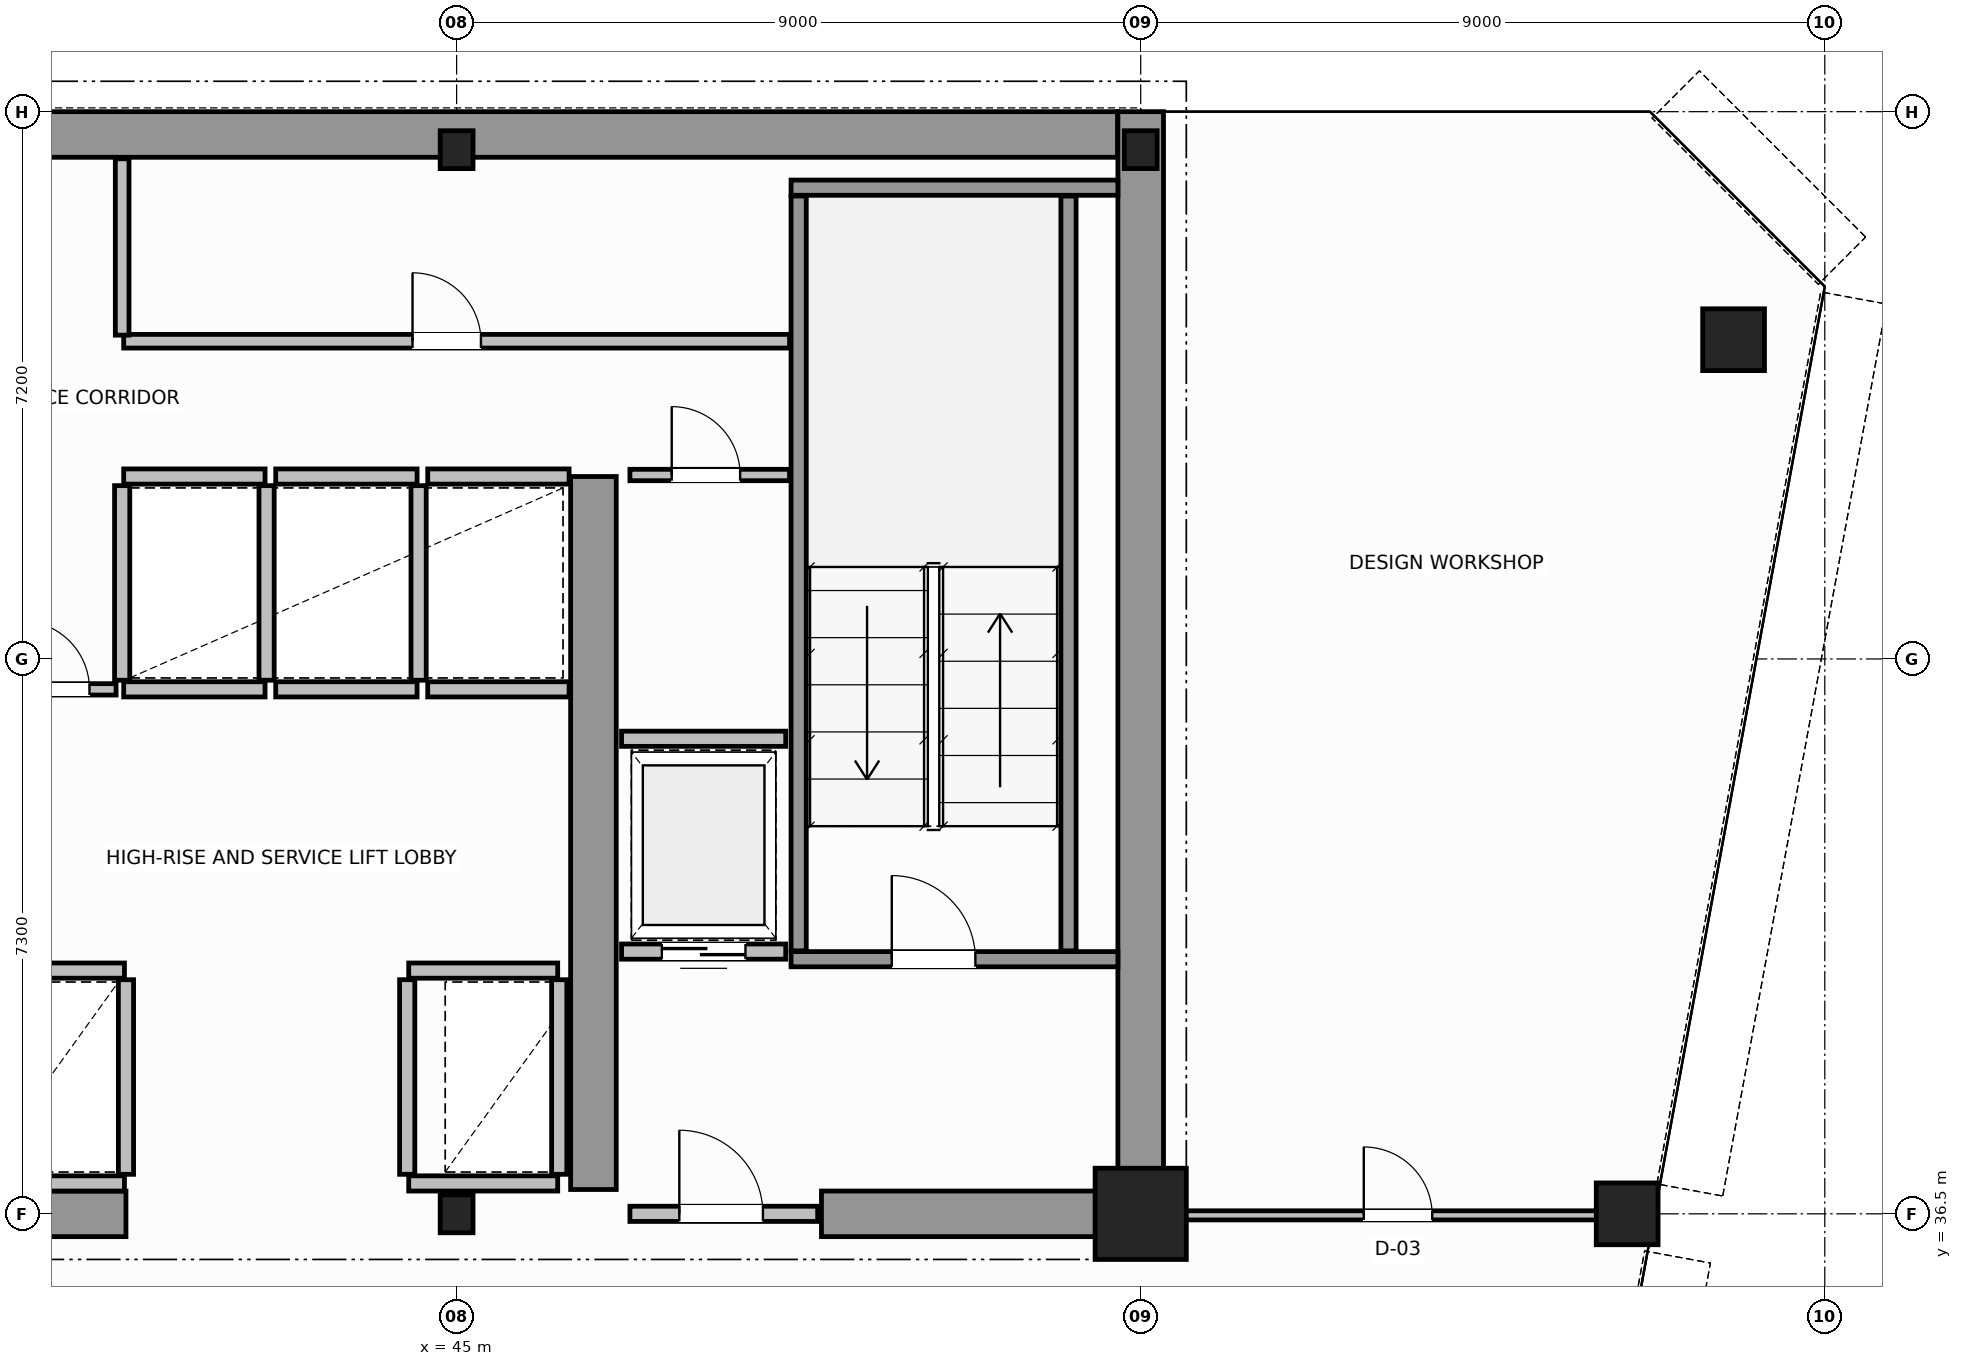
"""IFC4 building model, lengths in metres.
Left out: names, types, materials, properties, quantities, classifications, styles, units other than length and angle.
Written with IfcOpenShell. Run it as: python <this file> out.ifc"""

import sys

from ifc_helpers import new_model, si_unit, direction, frame, frame_2d, origin, origin_2d, place, context, subcontext, project, spatial, rectangle, hollow_circle, i_section, extrude, source, transform, mapped, element, fill, save


model = new_model("IFC4")
c1 = context("Model", 3, precision=1e-05, world=origin(), true_north=direction((0.0, 1.0)))
c2 = subcontext(c1, "Body", "Model", "MODEL_VIEW")
j1 = project(units=[si_unit("LENGTHUNIT", "METRE"), si_unit("PLANEANGLEUNIT", "RADIAN")], contexts=[c1])
p1 = place(None, origin())
s1 = spatial("IfcSite", under=j1, at=p1, CompositionType="ELEMENT")
p2 = place(p1, origin())
s2 = spatial("IfcBuilding", under=s1, at=p2, CompositionType="ELEMENT")
p3 = place(p2, frame((0.0, 0.0, 195.6)))
s3 = spatial("IfcBuildingStorey", under=s2, at=p3, CompositionType="ELEMENT", Elevation=195.6)
m1 = source(origin(), c2, "Body", "SweptSolid", [
    extrude(i_section(OverallWidth=0.432, OverallDepth=0.498, WebThickness=0.055, FlangeThickness=0.068, FilletRadius=0.015, at=origin_2d()), origin(), (0.0, 0.0, 1.0), 3.8),
])
p4 = place(p3, frame((45.0, 36.5, 0.0), z_axis=(0.0, 0.0, 1.0), x_axis=(1.0, 0.0, 0.0)))
e1 = element("IfcColumn", 1, at=p4, inside=s3, PredefinedType="COLUMN", context=c2, shape_type="MappedRepresentation", body=[
    mapped(m1, transform((0.0, 0.0, 0.0), scale=1.0)),
])
m2 = source(origin(), c2, "Body", "SweptSolid", [
    extrude(rectangle(XDim=1.2, YDim=1.2, at=origin_2d()), origin(), (0.0, 0.0, 1.0), 3.8),
])
p5 = place(p3, frame((54.0, 36.5, 0.0), z_axis=(0.0, 0.0, 1.0), x_axis=(1.0, 0.0, 0.0)))
e2 = element("IfcColumn", 2, at=p5, inside=s3, PredefinedType="COLUMN", context=c2, shape_type="MappedRepresentation", body=[
    mapped(m2, transform((0.0, 0.0, 0.0), scale=1.0)),
])
for number, where, z_axis, x_axis in (
    (3, (45.0, 50.5, 0.0), (0.0, 0.0, 1.0), (1.0, 0.0, 0.0)),
    (4, (54.0, 50.5, 0.0), (0.0, 0.0, 1.0), (1.0, 0.0, 0.0)),
):
    element("IfcColumn", number, at=place(p3, frame(where, z_axis=z_axis, x_axis=x_axis)), inside=s3, PredefinedType="COLUMN", context=c2, shape_type="MappedRepresentation", body=[
        mapped(m1, transform((0.0, 0.0, 0.0), scale=1.0)),
    ])
m3 = source(origin(), c2, "Body", "SweptSolid", [
    extrude(hollow_circle(Radius=0.406, WallThickness=0.04, at=origin_2d()), origin(), (0.0, 0.0, 1.0), 3.8),
])
for number, where, z_axis, x_axis in (
    (5, (61.8, 48.0, 0.0), (0.0, 0.0, 1.0), (1.0, 0.0, 0.0)),
    (6, (60.4, 36.5, 0.0), (0.0, 0.0, 1.0), (1.0, 0.0, 0.0)),
):
    element("IfcColumn", number, at=place(p3, frame(where, z_axis=z_axis, x_axis=x_axis)), inside=s3, PredefinedType="COLUMN", context=c2, shape_type="MappedRepresentation", body=[
        mapped(m3, transform((0.0, 0.0, 0.0), scale=1.0)),
    ])
p6 = place(p3, frame((34.002, 50.7, 0.0), z_axis=(0.0, 0.0, 1.0), x_axis=(1.0, 0.0, 0.0)))
e7 = element("IfcWall", 7, at=p6, inside=s3, PredefinedType="SHEAR", context=c2, shape_type="SweptSolid", body=[
    extrude(rectangle(XDim=19.694, YDim=0.6, at=frame_2d((9.847, 0.0))), origin(), (0.0, 0.0, 1.0), 3.8),
])
p7 = place(p3, frame((54.0, 36.5, 0.0), z_axis=(0.0, 0.0, 1.0), x_axis=(0.0, 1.0, 0.0)))
e8 = element("IfcWall", 8, at=p7, inside=s3, PredefinedType="SHEAR", context=c2, shape_type="SweptSolid", body=[
    extrude(rectangle(XDim=14.5, YDim=0.6, at=frame_2d((7.25, 0.0))), origin(), (0.0, 0.0, 1.0), 3.8),
])
p8 = place(p3, frame((36.15, 36.5, 0.0), z_axis=(0.0, 0.0, 1.0), x_axis=(1.0, 0.0, 0.0)))
e9 = element("IfcWall", 9, at=p8, inside=s3, PredefinedType="SHEAR", context=c2, shape_type="SweptSolid", body=[
    extrude(rectangle(XDim=4.5, YDim=0.6, at=frame_2d((2.25, 0.0))), origin(), (0.0, 0.0, 1.0), 3.8),
])
p9 = place(p3, frame((49.8, 36.5, 0.0), z_axis=(0.0, 0.0, 1.0), x_axis=(1.0, 0.0, 0.0)))
e10 = element("IfcWall", 10, at=p9, inside=s3, PredefinedType="SHEAR", context=c2, shape_type="SweptSolid", body=[
    extrude(rectangle(XDim=3.88, YDim=0.6, at=frame_2d((1.94, 0.0))), origin(), (0.0, 0.0, 1.0), 2.58),
])
p10 = place(p3, frame((46.8, 36.82, 0.0), z_axis=(0.0, 0.0, 1.0), x_axis=(0.0, 1.0, 0.0)))
e11 = element("IfcWall", 11, at=p10, inside=s3, PredefinedType="SHEAR", context=c2, shape_type="SweptSolid", body=[
    extrude(rectangle(XDim=9.38, YDim=0.6, at=frame_2d((4.69, 0.0))), origin(), (0.0, 0.0, 1.0), 3.8),
])
p11 = place(p3, frame((49.4, 39.85, 0.0), z_axis=(0.0, 0.0, 1.0), x_axis=(1.0, 0.0, 0.0)))
e12 = element("IfcWall", 12, at=p11, inside=s3, PredefinedType="SOLIDWALL", context=c2, shape_type="SweptSolid", body=[
    extrude(rectangle(XDim=4.3, YDim=0.2, at=frame_2d((2.15, 0.0))), origin(), (0.0, 0.0, 1.0), 3.8),
])
p12 = place(p11, frame((1.325, 0.0, 0.0)))
e13 = element("IfcOpeningElement", 13, at=p12, cuts=e12, PredefinedType="OPENING", context=c2, shape_type="SweptSolid", body=[
    extrude(rectangle(XDim=1.1, YDim=2.15, at=frame_2d((0.55, 1.075))), frame((0.0, 0.11, 0.0), z_axis=(0.0, -1.0, 0.0), x_axis=(1.0, 0.0, 0.0)), (0.0, 0.0, 1.0), 0.22),
])
p13 = place(p3, frame((49.4, 50.0, 0.0), z_axis=(0.0, 0.0, 1.0), x_axis=(1.0, 0.0, 0.0)))
e14 = element("IfcWall", 14, at=p13, inside=s3, PredefinedType="SOLIDWALL", context=c2, shape_type="SweptSolid", body=[
    extrude(rectangle(XDim=4.3, YDim=0.2, at=frame_2d((2.15, 0.0))), origin(), (0.0, 0.0, 1.0), 3.8),
])
for number, where, z_axis, x_axis in (
    (15, (49.5, 39.96, 0.0), (0.0, 0.0, 1.0), (0.0, 1.0, 0.0)),
    (16, (53.05, 39.96, 0.0), (0.0, 0.0, 1.0), (0.0, 1.0, 0.0)),
):
    element("IfcWall", number, at=place(p3, frame(where, z_axis=z_axis, x_axis=x_axis)), inside=s3, PredefinedType="SOLIDWALL", context=c2, shape_type="SweptSolid", body=[
        extrude(rectangle(XDim=9.93, YDim=0.2, at=frame_2d((4.965, 0.0))), origin(), (0.0, 0.0, 1.0), 3.8),
    ])
p14 = place(p3, frame((47.28, 36.5, 0.0), z_axis=(0.0, 0.0, 1.0), x_axis=(1.0, 0.0, 0.0)))
e17 = element("IfcWall", 17, at=p14, inside=s3, PredefinedType="SOLIDWALL", context=c2, shape_type="SweptSolid", body=[
    extrude(rectangle(XDim=2.47, YDim=0.2, at=frame_2d((1.235, 0.0))), origin(), (0.0, 0.0, 1.0), 2.57),
])
p15 = place(p14, frame((0.65, 0.0, 0.0)))
e18 = element("IfcOpeningElement", 18, at=p15, cuts=e17, PredefinedType="OPENING", context=c2, shape_type="SweptSolid", body=[
    extrude(rectangle(XDim=1.1, YDim=2.15, at=frame_2d((0.55, 1.075))), frame((0.0, 0.11, 0.0), z_axis=(0.0, -1.0, 0.0), x_axis=(1.0, 0.0, 0.0)), (0.0, 0.0, 1.0), 0.22),
])
for number, where, z_axis, x_axis in (
    (19, (38.71, 39.7, 0.0), (0.0, 0.0, 1.0), (1.0, 0.0, 0.0)),
    (20, (38.71, 36.9, 0.0), (0.0, 0.0, 1.0), (1.0, 0.0, 0.0)),
):
    element("IfcWall", number, at=place(p3, frame(where, z_axis=z_axis, x_axis=x_axis)), inside=s3, PredefinedType="SOLIDWALL", context=c2, shape_type="SweptSolid", body=[
        extrude(rectangle(XDim=1.92, YDim=0.2, at=frame_2d((0.96, 0.0))), origin(), (0.0, 0.0, 1.0), 3.58),
    ])
p16 = place(p3, frame((40.65, 37.02, 0.0), z_axis=(0.0, 0.0, 1.0), x_axis=(0.0, 1.0, 0.0)))
e21 = element("IfcWall", 21, at=p16, inside=s3, PredefinedType="SOLIDWALL", context=c2, shape_type="SweptSolid", body=[
    extrude(rectangle(XDim=2.56, YDim=0.2, at=frame_2d((1.28, 0.0))), origin(), (0.0, 0.0, 1.0), 3.58),
])
p17 = place(p3, frame((44.37, 39.7, 0.0), z_axis=(0.0, 0.0, 1.0), x_axis=(1.0, 0.0, 0.0)))
e22 = element("IfcWall", 22, at=p17, inside=s3, PredefinedType="SOLIDWALL", context=c2, shape_type="SweptSolid", body=[
    extrude(rectangle(XDim=1.96, YDim=0.2, at=frame_2d((0.98, 0.0))), origin(), (0.0, 0.0, 1.0), 3.58),
])
p18 = place(p3, frame((44.37, 36.9, 0.0), z_axis=(0.0, 0.0, 1.0), x_axis=(1.0, 0.0, 0.0)))
e23 = element("IfcWall", 23, at=p18, inside=s3, PredefinedType="SOLIDWALL", context=c2, shape_type="SweptSolid", body=[
    extrude(rectangle(XDim=1.96, YDim=0.2, at=frame_2d((0.98, 0.0))), origin(), (0.0, 0.0, 1.0), 2.57),
])
for number, where, z_axis, x_axis in (
    (24, (44.35, 37.02, 0.0), (0.0, 0.0, 1.0), (0.0, 1.0, 0.0)),
    (25, (46.35, 37.02, 0.0), (0.0, 0.0, 1.0), (0.0, 1.0, 0.0)),
):
    element("IfcWall", number, at=place(p3, frame(where, z_axis=z_axis, x_axis=x_axis)), inside=s3, PredefinedType="SOLIDWALL", context=c2, shape_type="SweptSolid", body=[
        extrude(rectangle(XDim=2.56, YDim=0.2, at=frame_2d((1.28, 0.0))), origin(), (0.0, 0.0, 1.0), 3.58),
    ])
for number, where, z_axis, x_axis in (
    (26, (40.62, 43.4, 0.0), (0.0, 0.0, 1.0), (1.0, 0.0, 0.0)),
    (27, (40.62, 46.2, 0.0), (0.0, 0.0, 1.0), (1.0, 0.0, 0.0)),
):
    element("IfcWall", number, at=place(p3, frame(where, z_axis=z_axis, x_axis=x_axis)), inside=s3, PredefinedType="SOLIDWALL", context=c2, shape_type="SweptSolid", body=[
        extrude(rectangle(XDim=1.86, YDim=0.2, at=frame_2d((0.93, 0.0))), origin(), (0.0, 0.0, 1.0), 3.58),
    ])
for number, where, z_axis, x_axis in (
    (28, (40.6, 43.52, 0.0), (0.0, 0.0, 1.0), (0.0, 1.0, 0.0)),
    (29, (42.5, 43.52, 0.0), (0.0, 0.0, 1.0), (0.0, 1.0, 0.0)),
):
    element("IfcWall", number, at=place(p3, frame(where, z_axis=z_axis, x_axis=x_axis)), inside=s3, PredefinedType="SOLIDWALL", context=c2, shape_type="SweptSolid", body=[
        extrude(rectangle(XDim=2.56, YDim=0.2, at=frame_2d((1.28, 0.0))), origin(), (0.0, 0.0, 1.0), 3.58),
    ])
for number, where, z_axis, x_axis in (
    (30, (42.62, 43.4, 0.0), (0.0, 0.0, 1.0), (1.0, 0.0, 0.0)),
    (31, (42.62, 46.2, 0.0), (0.0, 0.0, 1.0), (1.0, 0.0, 0.0)),
):
    element("IfcWall", number, at=place(p3, frame(where, z_axis=z_axis, x_axis=x_axis)), inside=s3, PredefinedType="SOLIDWALL", context=c2, shape_type="SweptSolid", body=[
        extrude(rectangle(XDim=1.86, YDim=0.2, at=frame_2d((0.93, 0.0))), origin(), (0.0, 0.0, 1.0), 3.58),
    ])
p19 = place(p3, frame((44.5, 43.52, 0.0), z_axis=(0.0, 0.0, 1.0), x_axis=(0.0, 1.0, 0.0)))
e32 = element("IfcWall", 32, at=p19, inside=s3, PredefinedType="SOLIDWALL", context=c2, shape_type="SweptSolid", body=[
    extrude(rectangle(XDim=2.56, YDim=0.2, at=frame_2d((1.28, 0.0))), origin(), (0.0, 0.0, 1.0), 3.58),
])
for number, where, z_axis, x_axis in (
    (33, (44.62, 43.4, 0.0), (0.0, 0.0, 1.0), (1.0, 0.0, 0.0)),
    (34, (44.62, 46.2, 0.0), (0.0, 0.0, 1.0), (1.0, 0.0, 0.0)),
):
    element("IfcWall", number, at=place(p3, frame(where, z_axis=z_axis, x_axis=x_axis)), inside=s3, PredefinedType="SOLIDWALL", context=c2, shape_type="SweptSolid", body=[
        extrude(rectangle(XDim=1.86, YDim=0.2, at=frame_2d((0.93, 0.0))), origin(), (0.0, 0.0, 1.0), 3.58),
    ])
p20 = place(p3, frame((47.17, 39.95, 0.0), z_axis=(0.0, 0.0, 1.0), x_axis=(1.0, 0.0, 0.0)))
e35 = element("IfcWall", 35, at=p20, inside=s3, PredefinedType="SOLIDWALL", context=c2, shape_type="SweptSolid", body=[
    extrude(rectangle(XDim=2.16, YDim=0.2, at=frame_2d((1.08, 0.0))), origin(), (0.0, 0.0, 1.0), 3.58),
])
p21 = place(p20, frame((0.53, 0.0, 0.0)))
e36 = element("IfcOpeningElement", 36, at=p21, cuts=e35, PredefinedType="OPENING", context=c2, shape_type="SweptSolid", body=[
    extrude(rectangle(XDim=1.1, YDim=2.15, at=frame_2d((0.55, 1.075))), frame((0.0, 0.11, 0.0), z_axis=(0.0, -1.0, 0.0), x_axis=(1.0, 0.0, 0.0)), (0.0, 0.0, 1.0), 0.22),
])
p22 = place(p3, frame((47.17, 42.75, 0.0), z_axis=(0.0, 0.0, 1.0), x_axis=(1.0, 0.0, 0.0)))
e37 = element("IfcWall", 37, at=p22, inside=s3, PredefinedType="SOLIDWALL", context=c2, shape_type="SweptSolid", body=[
    extrude(rectangle(XDim=2.16, YDim=0.2, at=frame_2d((1.08, 0.0))), origin(), (0.0, 0.0, 1.0), 3.58),
])
p23 = place(p3, frame((47.28, 46.22, 0.0), z_axis=(0.0, 0.0, 1.0), x_axis=(1.0, 0.0, 0.0)))
e38 = element("IfcWall", 38, at=p23, inside=s3, PredefinedType="PARTITIONING", context=c2, shape_type="SweptSolid", body=[
    extrude(rectangle(XDim=2.1, YDim=0.15, at=frame_2d((1.05, 0.0))), origin(), (0.0, 0.0, 1.0), 3.58),
])
p24 = place(p23, frame((0.55, 0.0, 0.0)))
e39 = element("IfcOpeningElement", 39, at=p24, cuts=e38, PredefinedType="OPENING", context=c2, shape_type="SweptSolid", body=[
    extrude(rectangle(XDim=0.9, YDim=2.1, at=frame_2d((0.45, 1.05))), frame((0.0, 0.085, 0.0), z_axis=(0.0, -1.0, 0.0), x_axis=(1.0, 0.0, 0.0)), (0.0, 0.0, 1.0), 0.17),
])
p25 = place(p3, frame((38.92, 43.4, 0.0), z_axis=(0.0, 0.0, 1.0), x_axis=(1.0, 0.0, 0.0)))
e40 = element("IfcWall", 40, at=p25, inside=s3, PredefinedType="PARTITIONING", context=c2, shape_type="SweptSolid", body=[
    extrude(rectangle(XDim=1.6, YDim=0.15, at=frame_2d((0.8, 0.0))), origin(), (0.0, 0.0, 1.0), 3.58),
])
p26 = place(p25, frame((0.35, 0.0, 0.0)))
e41 = element("IfcOpeningElement", 41, at=p26, cuts=e40, PredefinedType="OPENING", context=c2, shape_type="SweptSolid", body=[
    extrude(rectangle(XDim=0.9, YDim=2.1, at=frame_2d((0.45, 1.05))), frame((0.0, 0.085, 0.0), z_axis=(0.0, -1.0, 0.0), x_axis=(1.0, 0.0, 0.0)), (0.0, 0.0, 1.0), 0.17),
])
p27 = place(p3, frame((40.62, 47.98, 0.0), z_axis=(0.0, 0.0, 1.0), x_axis=(1.0, 0.0, 0.0)))
e42 = element("IfcWall", 42, at=p27, inside=s3, PredefinedType="PLUMBINGWALL", context=c2, shape_type="SweptSolid", body=[
    extrude(rectangle(XDim=8.76, YDim=0.18, at=frame_2d((4.38, 0.0))), origin(), (0.0, 0.0, 1.0), 3.58),
])
p28 = place(p27, frame((3.8, 0.0, 0.0)))
e43 = element("IfcOpeningElement", 43, at=p28, cuts=e42, PredefinedType="OPENING", context=c2, shape_type="SweptSolid", body=[
    extrude(rectangle(XDim=0.9, YDim=2.15, at=frame_2d((0.45, 1.075))), frame((0.0, 0.1, 0.0), z_axis=(0.0, -1.0, 0.0), x_axis=(1.0, 0.0, 0.0)), (0.0, 0.0, 1.0), 0.2),
])
p29 = place(p3, frame((40.6, 48.06, 0.0), z_axis=(0.0, 0.0, 1.0), x_axis=(0.0, 1.0, 0.0)))
e44 = element("IfcWall", 44, at=p29, inside=s3, PredefinedType="PLUMBINGWALL", context=c2, shape_type="SweptSolid", body=[
    extrude(rectangle(XDim=2.32, YDim=0.18, at=frame_2d((1.16, 0.0))), origin(), (0.0, 0.0, 1.0), 3.58),
])
p30 = place(p3, frame((54.06, 36.48, 0.0), z_axis=(0.0, 0.0, 1.0), x_axis=(1.0, 0.0, 0.0)))
e45 = element("IfcWall", 45, at=p30, inside=s3, PredefinedType="PARTITIONING", context=c2, shape_type="SweptSolid", body=[
    extrude(rectangle(XDim=6.651, YDim=0.12, at=frame_2d((3.325, 0.0))), origin(), (0.0, 0.0, 1.0), 2.97),
])
p31 = place(p30, frame((2.875, 0.0, 0.0)))
e46 = element("IfcOpeningElement", 46, at=p31, cuts=e45, PredefinedType="OPENING", context=c2, shape_type="SweptSolid", body=[
    extrude(rectangle(XDim=0.9, YDim=2.15, at=frame_2d((0.45, 1.075))), frame((0.0, 0.07, 0.0), z_axis=(0.0, -1.0, 0.0), x_axis=(1.0, 0.0, 0.0)), (0.0, 0.0, 1.0), 0.14),
])
m4 = source(origin(), c2, "Body", "SweptSolid", [
    extrude(rectangle(XDim=1.1, YDim=2.15, at=frame_2d((0.55, 1.075))), frame((0.0, 0.025, 0.0), z_axis=(0.0, -1.0, 0.0), x_axis=(1.0, 0.0, 0.0)), (0.0, 0.0, 1.0), 0.05),
])
p32 = place(p12, origin())
e47 = element("IfcDoor", 47, at=p32, inside=s3, OperationType="SINGLE_SWING_RIGHT", PredefinedType="DOOR", context=c2, shape_type="MappedRepresentation", body=[
    mapped(m4, transform((0.0, 0.0, 0.0), scale=1.0)),
])
fill(e13, e47)
p33 = place(p15, origin())
e48 = element("IfcDoor", 48, at=p33, inside=s3, OperationType="SINGLE_SWING_LEFT", PredefinedType="DOOR", context=c2, shape_type="MappedRepresentation", body=[
    mapped(m4, transform((0.0, 0.0, 0.0), scale=1.0)),
])
fill(e18, e48)
p34 = place(p21, origin())
e49 = element("IfcDoor", 49, at=p34, inside=s3, OperationType="DOUBLE_DOOR_SLIDING", PredefinedType="DOOR", context=c2, shape_type="MappedRepresentation", body=[
    mapped(m4, transform((0.0, 0.0, 0.0), scale=1.0)),
])
fill(e36, e49)
m5 = source(origin(), c2, "Body", "SweptSolid", [
    extrude(rectangle(XDim=0.9, YDim=2.1, at=frame_2d((0.45, 1.05))), frame((0.0, 0.025, 0.0), z_axis=(0.0, -1.0, 0.0), x_axis=(1.0, 0.0, 0.0)), (0.0, 0.0, 1.0), 0.05),
])
p35 = place(p24, origin())
e50 = element("IfcDoor", 50, at=p35, inside=s3, OperationType="SINGLE_SWING_RIGHT", PredefinedType="DOOR", context=c2, shape_type="MappedRepresentation", body=[
    mapped(m5, transform((0.0, 0.0, 0.0), scale=1.0)),
])
fill(e39, e50)
p36 = place(p26, origin())
e51 = element("IfcDoor", 51, at=p36, inside=s3, OperationType="SINGLE_SWING_LEFT", PredefinedType="DOOR", context=c2, shape_type="MappedRepresentation", body=[
    mapped(m5, transform((0.0, 0.0, 0.0), scale=1.0)),
])
fill(e41, e51)
m6 = source(origin(), c2, "Body", "SweptSolid", [
    extrude(rectangle(XDim=0.9, YDim=2.15, at=frame_2d((0.45, 1.075))), frame((0.0, 0.025, 0.0), z_axis=(0.0, -1.0, 0.0), x_axis=(1.0, 0.0, 0.0)), (0.0, 0.0, 1.0), 0.05),
])
p37 = place(p28, origin())
e52 = element("IfcDoor", 52, at=p37, inside=s3, OperationType="SINGLE_SWING_RIGHT", PredefinedType="DOOR", context=c2, shape_type="MappedRepresentation", body=[
    mapped(m6, transform((0.0, 0.0, 0.0), scale=1.0)),
])
fill(e43, e52)
p38 = place(p31, origin())
e53 = element("IfcDoor", 53, at=p38, inside=s3, OperationType="SINGLE_SWING_RIGHT", PredefinedType="DOOR", context=c2, shape_type="MappedRepresentation", body=[
    mapped(m6, transform((0.0, 0.0, 0.0), scale=1.0)),
])
fill(e46, e53)
save(model, sys.argv[1])
